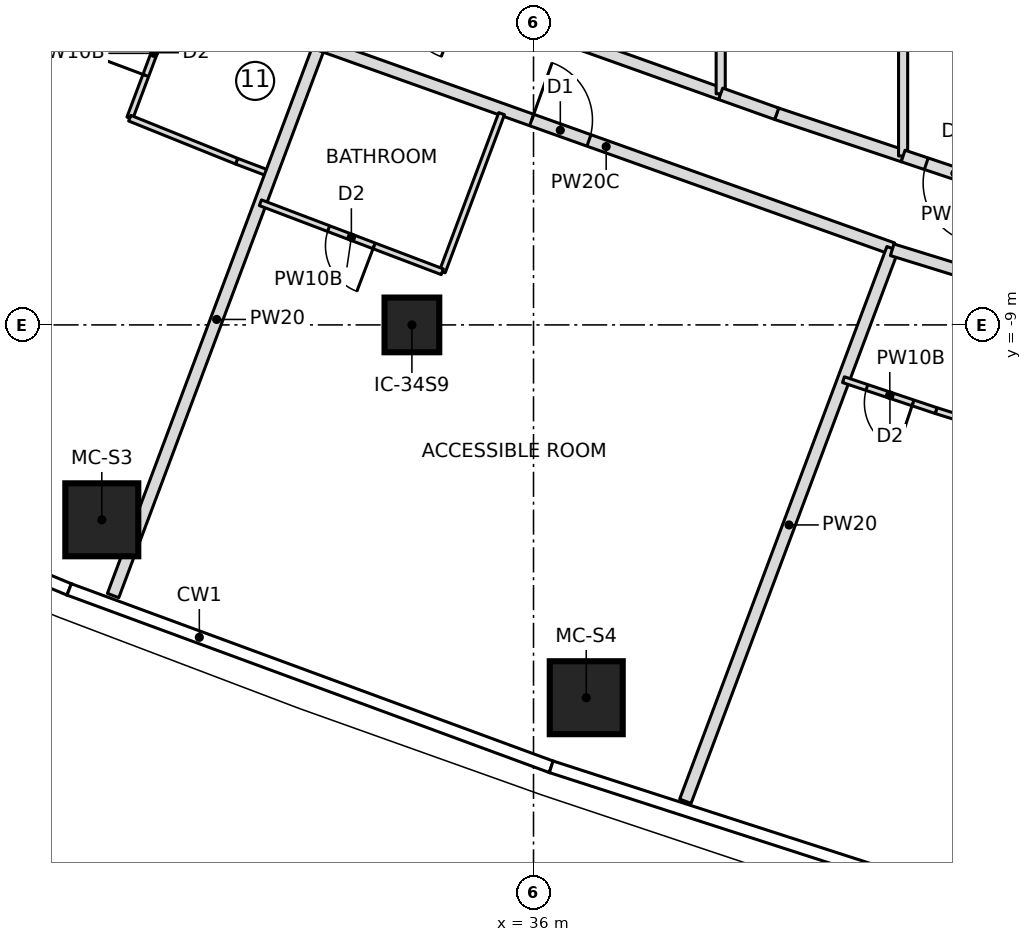
"""IFC4 building model, lengths in metres.
Left out: names, types, materials, properties, quantities, classifications, styles, units other than length and angle.
Written with IfcOpenShell. Run it as: python <this file> out.ifc"""

import sys

from ifc_helpers import new_model, si_unit, direction, frame, frame_2d, origin, origin_2d, place, context, subcontext, project, spatial, rectangle, extrude, element, fill, save


model = new_model("IFC4")
c1 = context("Model", 3, precision=1e-05, world=origin(), true_north=direction((0.0, 1.0)))
c2 = subcontext(c1, "Body", "Model", "MODEL_VIEW")
j1 = project(units=[si_unit("LENGTHUNIT", "METRE"), si_unit("PLANEANGLEUNIT", "RADIAN")], contexts=[c1])
p1 = place(None, origin())
s1 = spatial("IfcSite", under=j1, at=p1, CompositionType="ELEMENT")
p2 = place(p1, origin())
s2 = spatial("IfcBuilding", under=s1, at=p2, CompositionType="ELEMENT")
p3 = place(p2, frame((0.0, 0.0, 227.9)))
s3 = spatial("IfcBuildingStorey", under=s2, at=p3, CompositionType="ELEMENT", Elevation=227.9)
for number, where, z_axis, x_axis in (
    (1, (28.9, -12.205, 0.0), (0.0, 0.0, 1.0), (1.0, 0.0, 0.0)),
    (2, (36.867, -15.132, 0.0), (0.0, 0.0, 1.0), (1.0, 0.0, 0.0)),
):
    element("IfcColumn", number, at=place(p3, frame(where, z_axis=z_axis, x_axis=x_axis)), inside=s3, PredefinedType="COLUMN", context=c2, shape_type="SweptSolid", body=[
        extrude(rectangle(XDim=1.2, YDim=1.2, at=origin_2d()), origin(), (0.0, 0.0, 1.0), 3.55),
    ])
p4 = place(p3, frame((34.0, -9.0, 0.0), z_axis=(0.0, 0.0, 1.0), x_axis=(1.0, 0.0, 0.0)))
e3 = element("IfcColumn", 3, at=p4, inside=s3, PredefinedType="COLUMN", context=c2, shape_type="SweptSolid", body=[
    extrude(rectangle(XDim=0.9, YDim=0.9, at=origin_2d()), origin(), (0.0, 0.0, 1.0), 3.55),
])
p5 = place(p3, frame((29.36, -5.6, 0.0), z_axis=(0.0, 0.0, 1.0), x_axis=(0.351158682313, 0.936315961541, 0.0)))
e4 = element("IfcWall", 4, at=p5, inside=s3, PredefinedType="PARTITIONING", context=c2, shape_type="SweptSolid", body=[
    extrude(rectangle(XDim=2.278, YDim=0.1, at=frame_2d((1.139, 0.0))), origin(), (0.0, 0.0, 1.0), 3.25),
])
p6 = place(p5, frame((0.75, 0.0, 0.0)))
e5 = element("IfcOpeningElement", 5, at=p6, cuts=e4, PredefinedType="OPENING", context=c2, shape_type="SweptSolid", body=[
    extrude(rectangle(XDim=0.8, YDim=2.1, at=frame_2d((0.4, 1.05))), frame((0.0, 0.06, 0.0), z_axis=(0.0, -1.0, 0.0), x_axis=(1.0, 0.0, 0.0)), (0.0, 0.0, 1.0), 0.12),
])
p7 = place(p3, frame((31.684, -6.522, 0.0), z_axis=(0.0, 0.0, 1.0), x_axis=(-0.935048188903, 0.354520640342, 0.0)))
e6 = element("IfcWall", 6, at=p7, inside=s3, PredefinedType="PARTITIONING", context=c2, shape_type="SweptSolid", body=[
    extrude(rectangle(XDim=0.606, YDim=0.1, at=frame_2d((0.303, 0.0))), origin(), (0.0, 0.0, 1.0), 3.25),
])
p8 = place(p3, frame((31.117, -6.308, 0.0), z_axis=(0.0, 0.0, 1.0), x_axis=(-0.927594225674, 0.373589283166, 0.0)))
e7 = element("IfcWall", 7, at=p8, inside=s3, PredefinedType="PARTITIONING", context=c2, shape_type="SweptSolid", body=[
    extrude(rectangle(XDim=1.895, YDim=0.1, at=frame_2d((0.947, 0.0))), origin(), (0.0, 0.0, 1.0), 3.25),
])
p9 = place(p3, frame((29.086, -13.451, 0.0), z_axis=(0.0, 0.0, 1.0), x_axis=(0.351128958016, 0.93632710889, 0.0)))
e8 = element("IfcWall", 8, at=p9, inside=s3, PredefinedType="PARTITIONING", context=c2, shape_type="SweptSolid", body=[
    extrude(rectangle(XDim=9.7, YDim=0.2, at=frame_2d((4.85, 0.0))), origin(), (0.0, 0.0, 1.0), 3.25),
])
p10 = place(p3, frame((32.485, -4.388, 0.0), z_axis=(0.0, 0.0, 1.0), x_axis=(0.941953797829, -0.335742524498, 0.0)))
e9 = element("IfcWall", 9, at=p10, inside=s3, PredefinedType="PARTITIONING", context=c2, shape_type="SweptSolid", body=[
    extrude(rectangle(XDim=10.001, YDim=0.2, at=frame_2d((5.001, 0.0))), origin(), (0.0, 0.0, 1.0), 3.25),
])
p11 = place(p10, frame((3.7, 0.0, 0.0)))
e10 = element("IfcOpeningElement", 10, at=p11, cuts=e9, PredefinedType="OPENING", context=c2, shape_type="SweptSolid", body=[
    extrude(rectangle(XDim=1.0, YDim=2.1, at=frame_2d((0.5, 1.05))), frame((0.0, 0.11, 0.0), z_axis=(0.0, -1.0, 0.0), x_axis=(1.0, 0.0, 0.0)), (0.0, 0.0, 1.0), 0.22),
])
p12 = place(p3, frame((35.475, -5.526, 0.0), z_axis=(0.0, 0.0, 1.0), x_axis=(-0.351065630332, -0.936350854755, 0.0)))
e11 = element("IfcWall", 11, at=p12, inside=s3, PredefinedType="PARTITIONING", context=c2, shape_type="SweptSolid", body=[
    extrude(rectangle(XDim=2.777, YDim=0.1, at=frame_2d((1.388, 0.0))), origin(), (0.0, 0.0, 1.0), 3.25),
])
p13 = place(p3, frame((34.5, -8.126, 0.0), z_axis=(0.0, 0.0, 1.0), x_axis=(-0.934948661714, 0.354783032232, 0.0)))
e12 = element("IfcWall", 12, at=p13, inside=s3, PredefinedType="PARTITIONING", context=c2, shape_type="SweptSolid", body=[
    extrude(rectangle(XDim=3.2, YDim=0.1, at=frame_2d((1.6, 0.0))), origin(), (0.0, 0.0, 1.0), 3.25),
])
p14 = place(p13, frame((1.2, 0.0, 0.0)))
e13 = element("IfcOpeningElement", 13, at=p14, cuts=e12, PredefinedType="OPENING", context=c2, shape_type="SweptSolid", body=[
    extrude(rectangle(XDim=0.8, YDim=2.1, at=frame_2d((0.4, 1.05))), frame((0.0, 0.06, 0.0), z_axis=(0.0, -1.0, 0.0), x_axis=(1.0, 0.0, 0.0)), (0.0, 0.0, 1.0), 0.12),
])
p15 = place(p3, frame((38.497, -16.834, 0.0), z_axis=(0.0, 0.0, 1.0), x_axis=(0.35112895446, 0.936327110224, 0.0)))
e14 = element("IfcWall", 14, at=p15, inside=s3, PredefinedType="PARTITIONING", context=c2, shape_type="SweptSolid", body=[
    extrude(rectangle(XDim=9.706, YDim=0.2, at=frame_2d((4.853, 0.0))), origin(), (0.0, 0.0, 1.0), 3.25),
])
p16 = place(p3, frame((43.128, -10.568, 0.0), z_axis=(0.0, 0.0, 1.0), x_axis=(-0.954618903587, 0.297830067176, 0.0)))
e15 = element("IfcWall", 15, at=p16, inside=s3, PredefinedType="PARTITIONING", context=c2, shape_type="SweptSolid", body=[
    extrude(rectangle(XDim=0.531, YDim=0.1, at=frame_2d((0.266, 0.0))), origin(), (0.0, 0.0, 1.0), 3.25),
])
p17 = place(p3, frame((42.621, -10.409, 0.0), z_axis=(0.0, 0.0, 1.0), x_axis=(-0.948485479965, 0.3168206027, 0.0)))
e16 = element("IfcWall", 16, at=p17, inside=s3, PredefinedType="PARTITIONING", context=c2, shape_type="SweptSolid", body=[
    extrude(rectangle(XDim=1.606, YDim=0.1, at=frame_2d((0.803, 0.0))), origin(), (0.0, 0.0, 1.0), 3.25),
])
p18 = place(p17, frame((0.4, 0.0, 0.0)))
e17 = element("IfcOpeningElement", 17, at=p18, cuts=e16, PredefinedType="OPENING", context=c2, shape_type="SweptSolid", body=[
    extrude(rectangle(XDim=0.8, YDim=2.1, at=frame_2d((0.4, 1.05))), frame((0.0, 0.06, 0.0), z_axis=(0.0, -1.0, 0.0), x_axis=(1.0, 0.0, 0.0)), (0.0, 0.0, 1.0), 0.12),
])
p19 = place(p3, frame((39.078, -5.199, 0.0), z_axis=(0.0, 0.0, 1.0), x_axis=(-0.941908381697, 0.335869916023, 0.0)))
e18 = element("IfcWall", 18, at=p19, inside=s3, PredefinedType="PARTITIONING", context=c2, shape_type="SweptSolid", body=[
    extrude(rectangle(XDim=3.017, YDim=0.2, at=frame_2d((1.509, 0.0))), origin(), (0.0, 0.0, 1.0), 3.25),
])
p20 = place(p3, frame((39.078, -5.199, 0.0), z_axis=(0.0, 0.0, 1.0), x_axis=(0.0, 1.0, 0.0)))
e19 = element("IfcWall", 19, at=p20, inside=s3, PredefinedType="PARTITIONING", context=c2, shape_type="SweptSolid", body=[
    extrude(rectangle(XDim=10.398, YDim=0.15, at=frame_2d((5.199, 0.0))), origin(), (0.0, 0.0, 1.0), 3.25),
])
p21 = place(p3, frame((42.078, -6.222, 0.0), z_axis=(0.0, 0.0, 1.0), x_axis=(-0.9484714727, 0.316862534034, 0.0)))
e20 = element("IfcWall", 20, at=p21, inside=s3, PredefinedType="PARTITIONING", context=c2, shape_type="SweptSolid", body=[
    extrude(rectangle(XDim=2.192, YDim=0.2, at=frame_2d((1.096, 0.0))), origin(), (0.0, 0.0, 1.0), 3.25),
])
p22 = place(p3, frame((39.999, -5.527, 0.0), z_axis=(0.0, 0.0, 1.0), x_axis=(-0.941911279377, 0.335861789704, 0.0)))
e21 = element("IfcWall", 21, at=p22, inside=s3, PredefinedType="PARTITIONING", context=c2, shape_type="SweptSolid", body=[
    extrude(rectangle(XDim=0.978, YDim=0.2, at=frame_2d((0.489, 0.0))), origin(), (0.0, 0.0, 1.0), 3.25),
])
p23 = place(p3, frame((42.078, -6.222, 0.0), z_axis=(0.0, 0.0, 1.0), x_axis=(0.0, 1.0, 0.0)))
e22 = element("IfcWall", 22, at=p23, inside=s3, PredefinedType="PARTITIONING", context=c2, shape_type="SweptSolid", body=[
    extrude(rectangle(XDim=12.444, YDim=0.15, at=frame_2d((6.222, 0.0))), origin(), (0.0, 0.0, 1.0), 3.25),
])
p24 = place(p3, frame((43.788, -6.793, 0.0), z_axis=(0.0, 0.0, 1.0), x_axis=(-0.948466406859, 0.316877697323, 0.0)))
e23 = element("IfcWall", 23, at=p24, inside=s3, PredefinedType="PARTITIONING", context=c2, shape_type="SweptSolid", body=[
    extrude(rectangle(XDim=1.803, YDim=0.2, at=frame_2d((0.901, 0.0))), origin(), (0.0, 0.0, 1.0), 3.25),
])
p25 = place(p24, frame((0.402, 0.0, 0.0)))
e24 = element("IfcOpeningElement", 24, at=p25, cuts=e23, PredefinedType="OPENING", context=c2, shape_type="SweptSolid", body=[
    extrude(rectangle(XDim=1.0, YDim=2.1, at=frame_2d((0.5, 1.05))), frame((0.0, 0.11, 0.0), z_axis=(0.0, -1.0, 0.0), x_axis=(1.0, 0.0, 0.0)), (0.0, 0.0, 1.0), 0.22),
])
p26 = place(p3, frame((41.898, -7.764, 0.0), z_axis=(0.0, 0.0, 1.0), x_axis=(0.955502033518, -0.294984514752, 0.0)))
e25 = element("IfcWall", 25, at=p26, inside=s3, PredefinedType="PARTITIONING", context=c2, shape_type="SweptSolid", body=[
    extrude(rectangle(XDim=6.7, YDim=0.2, at=frame_2d((3.35, 0.0))), origin(), (0.0, 0.0, 1.0), 3.25),
])
p27 = place(p26, frame((3.95, 0.0, 0.0)))
e26 = element("IfcOpeningElement", 26, at=p27, cuts=e25, PredefinedType="OPENING", context=c2, shape_type="SweptSolid", body=[
    extrude(rectangle(XDim=1.5, YDim=2.1, at=frame_2d((0.75, 1.05))), frame((0.0, 0.11, 0.0), z_axis=(0.0, -1.0, 0.0), x_axis=(1.0, 0.0, 0.0)), (0.0, 0.0, 1.0), 0.22),
])
p28 = place(p6, origin())
e27 = element("IfcDoor", 27, at=p28, inside=s3, OperationType="SINGLE_SWING_LEFT", PredefinedType="DOOR", context=c2, shape_type="SweptSolid", body=[
    extrude(rectangle(XDim=0.8, YDim=2.1, at=frame_2d((0.4, 1.05))), frame((0.0, 0.025, 0.0), z_axis=(0.0, -1.0, 0.0), x_axis=(1.0, 0.0, 0.0)), (0.0, 0.0, 1.0), 0.05),
])
fill(e5, e27)
p29 = place(p14, origin())
e28 = element("IfcDoor", 28, at=p29, inside=s3, OperationType="SINGLE_SWING_LEFT", PredefinedType="DOOR", context=c2, shape_type="SweptSolid", body=[
    extrude(rectangle(XDim=0.8, YDim=2.1, at=frame_2d((0.4, 1.05))), frame((0.0, 0.025, 0.0), z_axis=(0.0, -1.0, 0.0), x_axis=(1.0, 0.0, 0.0)), (0.0, 0.0, 1.0), 0.05),
])
fill(e13, e28)
p30 = place(p11, origin())
e29 = element("IfcDoor", 29, at=p30, inside=s3, OperationType="SINGLE_SWING_LEFT", PredefinedType="DOOR", context=c2, shape_type="SweptSolid", body=[
    extrude(rectangle(XDim=1.0, YDim=2.1, at=frame_2d((0.5, 1.05))), frame((0.0, 0.025, 0.0), z_axis=(0.0, -1.0, 0.0), x_axis=(1.0, 0.0, 0.0)), (0.0, 0.0, 1.0), 0.05),
])
fill(e10, e29)
p31 = place(p18, origin())
e30 = element("IfcDoor", 30, at=p31, inside=s3, OperationType="SINGLE_SWING_LEFT", PredefinedType="DOOR", context=c2, shape_type="SweptSolid", body=[
    extrude(rectangle(XDim=0.8, YDim=2.1, at=frame_2d((0.4, 1.05))), frame((0.0, 0.025, 0.0), z_axis=(0.0, -1.0, 0.0), x_axis=(1.0, 0.0, 0.0)), (0.0, 0.0, 1.0), 0.05),
])
fill(e17, e30)
p32 = place(p25, origin())
e31 = element("IfcDoor", 31, at=p32, inside=s3, OperationType="SINGLE_SWING_LEFT", PredefinedType="DOOR", context=c2, shape_type="SweptSolid", body=[
    extrude(rectangle(XDim=1.0, YDim=2.1, at=frame_2d((0.5, 1.05))), frame((0.0, 0.025, 0.0), z_axis=(0.0, -1.0, 0.0), x_axis=(1.0, 0.0, 0.0)), (0.0, 0.0, 1.0), 0.05),
])
fill(e24, e31)
save(model, sys.argv[1])
